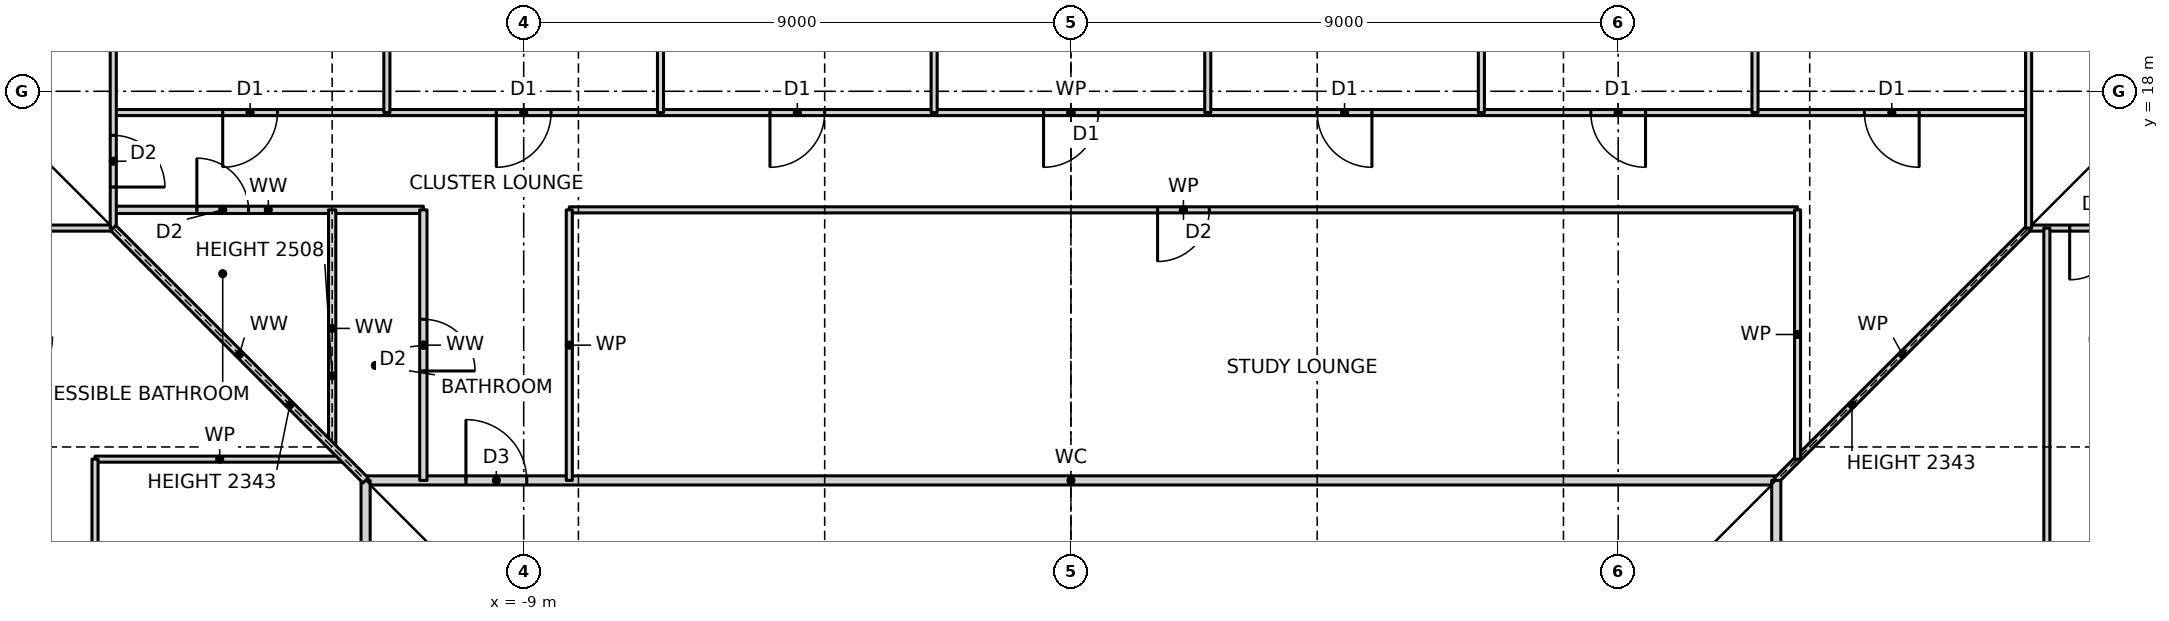
"""IFC4 building model, lengths in metres.
Left out: names, types, materials, properties, quantities, classifications, styles, units other than length and angle.
Written with IfcOpenShell. Run it as: python <this file> out.ifc"""

import sys

from ifc_helpers import new_model, si_unit, direction, frame, frame_2d, origin, place, context, subcontext, project, spatial, rectangle, extrude, element, fill, save


model = new_model("IFC4")
c1 = context("Model", 3, precision=1e-05, world=origin(), true_north=direction((0.0, 1.0)))
c2 = subcontext(c1, "Body", "Model", "MODEL_VIEW")
j1 = project(units=[si_unit("LENGTHUNIT", "METRE"), si_unit("PLANEANGLEUNIT", "RADIAN")], contexts=[c1])
p1 = place(None, origin())
s1 = spatial("IfcSite", under=j1, at=p1, CompositionType="ELEMENT")
p2 = place(p1, origin())
s2 = spatial("IfcBuilding", under=s1, at=p2, CompositionType="ELEMENT")
p3 = place(p2, frame((0.0, 0.0, 22.0)))
s3 = spatial("IfcBuildingStorey", under=s2, at=p3, CompositionType="ELEMENT", Elevation=22.0)
p4 = place(p3, frame((-11.6, 11.6, 0.0), z_axis=(0.0, 0.0, 1.0), x_axis=(1.0, 0.0, 0.0)))
e1 = element("IfcWall", 1, at=p4, inside=s3, PredefinedType="PARTITIONING", context=c2, shape_type="SweptSolid", body=[
    extrude(rectangle(XDim=23.2, YDim=0.15, at=frame_2d((11.6, 0.0))), origin(), (0.0, 0.0, 1.0), 3.27),
])
p5 = place(p4, frame((1.65, 0.0, 0.0)))
e2 = element("IfcOpeningElement", 2, at=p5, cuts=e1, PredefinedType="OPENING", context=c2, shape_type="SweptSolid", body=[
    extrude(rectangle(XDim=1.0, YDim=2.1, at=frame_2d((0.5, 1.05))), frame((0.0, 0.085, 0.0), z_axis=(0.0, -1.0, 0.0), x_axis=(1.0, 0.0, 0.0)), (0.0, 0.0, 1.0), 0.17),
])
p6 = place(p3, frame((-16.05, 11.95, 0.0), z_axis=(0.0, 0.0, 1.0), x_axis=(1.0, 0.0, 0.0)))
e3 = element("IfcWall", 3, at=p6, inside=s3, PredefinedType="PARTITIONING", context=c2, shape_type="SweptSolid", body=[
    extrude(rectangle(XDim=4.1, YDim=0.1, at=frame_2d((2.05, 0.0))), origin(), (0.0, 0.0, 1.0), 3.27),
])
p7 = place(p3, frame((-23.19, 15.75, 0.0), z_axis=(0.0, 0.0, 1.0), x_axis=(1.0, 0.0, 0.0)))
e4 = element("IfcWall", 4, at=p7, inside=s3, PredefinedType="PARTITIONING", context=c2, shape_type="SweptSolid", body=[
    extrude(rectangle(XDim=7.44, YDim=0.1, at=frame_2d((3.72, 0.0))), origin(), (0.0, 0.0, 1.0), 3.27),
])
p8 = place(p3, frame((15.75, 15.75, 0.0), z_axis=(0.0, 0.0, 1.0), x_axis=(1.0, 0.0, 0.0)))
e5 = element("IfcWall", 5, at=p8, inside=s3, PredefinedType="PARTITIONING", context=c2, shape_type="SweptSolid", body=[
    extrude(rectangle(XDim=7.44, YDim=0.1, at=frame_2d((3.72, 0.0))), origin(), (0.0, 0.0, 1.0), 3.27),
])
p9 = place(p8, frame((0.675, 0.0, 0.0)))
e6 = element("IfcOpeningElement", 6, at=p9, cuts=e5, PredefinedType="OPENING", context=c2, shape_type="SweptSolid", body=[
    extrude(rectangle(XDim=0.85, YDim=2.1, at=frame_2d((0.425, 1.05))), frame((0.0, 0.06, 0.0), z_axis=(0.0, -1.0, 0.0), x_axis=(1.0, 0.0, 0.0)), (0.0, 0.0, 1.0), 0.12),
])
p10 = place(p3, frame((-15.75, 16.05, 0.0), z_axis=(0.0, 0.0, 1.0), x_axis=(1.0, 0.0, 0.0)))
e7 = element("IfcWall", 7, at=p10, inside=s3, PredefinedType="PARTITIONING", context=c2, shape_type="SweptSolid", body=[
    extrude(rectangle(XDim=5.1, YDim=0.12, at=frame_2d((2.55, 0.0))), origin(), (0.0, 0.0, 1.0), 3.27),
])
p11 = place(p10, frame((1.375, 0.0, 0.0)))
e8 = element("IfcOpeningElement", 8, at=p11, cuts=e7, PredefinedType="OPENING", context=c2, shape_type="SweptSolid", body=[
    extrude(rectangle(XDim=0.85, YDim=2.1, at=frame_2d((0.425, 1.05))), frame((0.0, 0.07, 0.0), z_axis=(0.0, -1.0, 0.0), x_axis=(1.0, 0.0, 0.0)), (0.0, 0.0, 1.0), 0.14),
])
p12 = place(p3, frame((-8.25, 16.05, 0.0), z_axis=(0.0, 0.0, 1.0), x_axis=(1.0, 0.0, 0.0)))
e9 = element("IfcWall", 9, at=p12, inside=s3, PredefinedType="PARTITIONING", context=c2, shape_type="SweptSolid", body=[
    extrude(rectangle(XDim=20.2, YDim=0.1, at=frame_2d((10.1, 0.0))), origin(), (0.0, 0.0, 1.0), 3.27),
])
p13 = place(p12, frame((9.675, 0.0, 0.0)))
e10 = element("IfcOpeningElement", 10, at=p13, cuts=e9, PredefinedType="OPENING", context=c2, shape_type="SweptSolid", body=[
    extrude(rectangle(XDim=0.85, YDim=2.1, at=frame_2d((0.425, 1.05))), frame((0.0, 0.06, 0.0), z_axis=(0.0, -1.0, 0.0), x_axis=(1.0, 0.0, 0.0)), (0.0, 0.0, 1.0), 0.12),
])
p14 = place(p3, frame((-15.75, 17.65, 0.0), z_axis=(0.0, 0.0, 1.0), x_axis=(1.0, 0.0, 0.0)))
e11 = element("IfcWall", 11, at=p14, inside=s3, PredefinedType="PARTITIONING", context=c2, shape_type="SweptSolid", body=[
    extrude(rectangle(XDim=31.5, YDim=0.1, at=frame_2d((15.75, 0.0))), origin(), (0.0, 0.0, 1.0), 3.27),
])
p15 = place(p14, frame((28.8, 0.0, 0.0)))
e12 = element("IfcOpeningElement", 12, at=p15, cuts=e11, PredefinedType="OPENING", context=c2, shape_type="SweptSolid", body=[
    extrude(rectangle(XDim=0.9, YDim=2.1, at=frame_2d((0.45, 1.05))), frame((0.0, 0.06, 0.0), z_axis=(0.0, -1.0, 0.0), x_axis=(1.0, 0.0, 0.0)), (0.0, 0.0, 1.0), 0.12),
])
p16 = place(p14, frame((24.3, 0.0, 0.0)))
e13 = element("IfcOpeningElement", 13, at=p16, cuts=e11, PredefinedType="OPENING", context=c2, shape_type="SweptSolid", body=[
    extrude(rectangle(XDim=0.9, YDim=2.1, at=frame_2d((0.45, 1.05))), frame((0.0, 0.06, 0.0), z_axis=(0.0, -1.0, 0.0), x_axis=(1.0, 0.0, 0.0)), (0.0, 0.0, 1.0), 0.12),
])
p17 = place(p14, frame((19.8, 0.0, 0.0)))
e14 = element("IfcOpeningElement", 14, at=p17, cuts=e11, PredefinedType="OPENING", context=c2, shape_type="SweptSolid", body=[
    extrude(rectangle(XDim=0.9, YDim=2.1, at=frame_2d((0.45, 1.05))), frame((0.0, 0.06, 0.0), z_axis=(0.0, -1.0, 0.0), x_axis=(1.0, 0.0, 0.0)), (0.0, 0.0, 1.0), 0.12),
])
p18 = place(p14, frame((15.3, 0.0, 0.0)))
e15 = element("IfcOpeningElement", 15, at=p18, cuts=e11, PredefinedType="OPENING", context=c2, shape_type="SweptSolid", body=[
    extrude(rectangle(XDim=0.9, YDim=2.1, at=frame_2d((0.45, 1.05))), frame((0.0, 0.06, 0.0), z_axis=(0.0, -1.0, 0.0), x_axis=(1.0, 0.0, 0.0)), (0.0, 0.0, 1.0), 0.12),
])
p19 = place(p14, frame((10.8, 0.0, 0.0)))
e16 = element("IfcOpeningElement", 16, at=p19, cuts=e11, PredefinedType="OPENING", context=c2, shape_type="SweptSolid", body=[
    extrude(rectangle(XDim=0.9, YDim=2.1, at=frame_2d((0.45, 1.05))), frame((0.0, 0.06, 0.0), z_axis=(0.0, -1.0, 0.0), x_axis=(1.0, 0.0, 0.0)), (0.0, 0.0, 1.0), 0.12),
])
p20 = place(p14, frame((6.3, 0.0, 0.0)))
e17 = element("IfcOpeningElement", 17, at=p20, cuts=e11, PredefinedType="OPENING", context=c2, shape_type="SweptSolid", body=[
    extrude(rectangle(XDim=0.9, YDim=2.1, at=frame_2d((0.45, 1.05))), frame((0.0, 0.06, 0.0), z_axis=(0.0, -1.0, 0.0), x_axis=(1.0, 0.0, 0.0)), (0.0, 0.0, 1.0), 0.12),
])
p21 = place(p14, frame((1.8, 0.0, 0.0)))
e18 = element("IfcOpeningElement", 18, at=p21, cuts=e11, PredefinedType="OPENING", context=c2, shape_type="SweptSolid", body=[
    extrude(rectangle(XDim=0.9, YDim=2.1, at=frame_2d((0.45, 1.05))), frame((0.0, 0.06, 0.0), z_axis=(0.0, -1.0, 0.0), x_axis=(1.0, 0.0, 0.0)), (0.0, 0.0, 1.0), 0.12),
])
p22 = place(p3, frame((11.6, 11.6, 0.0), z_axis=(0.0, 0.0, 1.0), x_axis=(0.707106781187, 0.707106781187, 0.0)))
e19 = element("IfcWall", 19, at=p22, inside=s3, PredefinedType="PARTITIONING", context=c2, shape_type="SweptSolid", body=[
    extrude(rectangle(XDim=5.869, YDim=0.1, at=frame_2d((2.935, 0.0))), origin(), (0.0, 0.0, 1.0), 2.343),
])
p23 = place(p3, frame((16.05, -3.75, 0.0), z_axis=(0.0, 0.0, 1.0), x_axis=(0.0, 1.0, 0.0)))
e20 = element("IfcWall", 20, at=p23, inside=s3, PredefinedType="PARTITIONING", context=c2, shape_type="SweptSolid", body=[
    extrude(rectangle(XDim=19.5, YDim=0.1, at=frame_2d((9.75, 0.0))), origin(), (0.0, 0.0, 1.0), 3.27),
])
p24 = place(p23, frame((9.325, 0.0, 0.0)))
e21 = element("IfcOpeningElement", 21, at=p24, cuts=e20, PredefinedType="OPENING", context=c2, shape_type="SweptSolid", body=[
    extrude(rectangle(XDim=0.85, YDim=2.1, at=frame_2d((0.425, 1.05))), frame((0.0, 0.06, 0.0), z_axis=(0.0, -1.0, 0.0), x_axis=(1.0, 0.0, 0.0)), (0.0, 0.0, 1.0), 0.12),
])
p25 = place(p3, frame((15.75, 15.75, 0.0), z_axis=(0.0, 0.0, 1.0), x_axis=(0.0, 1.0, 0.0)))
e22 = element("IfcWall", 22, at=p25, inside=s3, PredefinedType="PARTITIONING", context=c2, shape_type="SweptSolid", body=[
    extrude(rectangle(XDim=7.44, YDim=0.1, at=frame_2d((3.72, 0.0))), origin(), (0.0, 0.0, 1.0), 3.27),
])
p26 = place(p3, frame((11.95, 11.95, 0.0), z_axis=(0.0, 0.0, 1.0), x_axis=(0.0, 1.0, 0.0)))
e23 = element("IfcWall", 23, at=p26, inside=s3, PredefinedType="PARTITIONING", context=c2, shape_type="SweptSolid", body=[
    extrude(rectangle(XDim=4.1, YDim=0.1, at=frame_2d((2.05, 0.0))), origin(), (0.0, 0.0, 1.0), 3.27),
])
p27 = place(p3, frame((11.6, -12.6, 0.0), z_axis=(0.0, 0.0, 1.0), x_axis=(0.0, 1.0, 0.0)))
e24 = element("IfcWall", 24, at=p27, inside=s3, PredefinedType="PARTITIONING", context=c2, shape_type="SweptSolid", body=[
    extrude(rectangle(XDim=24.2, YDim=0.15, at=frame_2d((12.1, 0.0))), origin(), (0.0, 0.0, 1.0), 3.27),
])
p28 = place(p27, frame((7.0, 0.0, 0.0)))
e25 = element("IfcOpeningElement", 25, at=p28, cuts=e24, PredefinedType="OPENING", context=c2, shape_type="SweptSolid", body=[
    extrude(rectangle(XDim=1.0, YDim=2.1, at=frame_2d((0.5, 1.05))), frame((0.0, 0.085, 0.0), z_axis=(0.0, -1.0, 0.0), x_axis=(1.0, 0.0, 0.0)), (0.0, 0.0, 1.0), 0.17),
])
p29 = place(p27, frame((4.8, 0.0, 0.0)))
e26 = element("IfcOpeningElement", 26, at=p29, cuts=e24, PredefinedType="OPENING", context=c2, shape_type="SweptSolid", body=[
    extrude(rectangle(XDim=0.9, YDim=2.1, at=frame_2d((0.45, 1.05))), frame((0.0, 0.085, 0.0), z_axis=(0.0, -1.0, 0.0), x_axis=(1.0, 0.0, 0.0)), (0.0, 0.0, 1.0), 0.17),
])
for number, where, z_axis, x_axis in (
    (27, (11.25, 17.65, 0.0), (0.0, 0.0, 1.0), (0.0, 1.0, 0.0)),
    (28, (6.75, 17.65, 0.0), (0.0, 0.0, 1.0), (0.0, 1.0, 0.0)),
    (29, (2.25, 17.65, 0.0), (0.0, 0.0, 1.0), (0.0, 1.0, 0.0)),
    (30, (-2.25, 17.65, 0.0), (0.0, 0.0, 1.0), (0.0, 1.0, 0.0)),
    (31, (-6.75, 17.65, 0.0), (0.0, 0.0, 1.0), (0.0, 1.0, 0.0)),
):
    element("IfcWall", number, at=place(p3, frame(where, z_axis=z_axis, x_axis=x_axis)), inside=s3, PredefinedType="PARTITIONING", context=c2, shape_type="SweptSolid", body=[
        extrude(rectangle(XDim=5.54, YDim=0.1, at=frame_2d((2.77, 0.0))), origin(), (0.0, 0.0, 1.0), 3.27),
    ])
p30 = place(p3, frame((-8.25, 11.6, 0.0), z_axis=(0.0, 0.0, 1.0), x_axis=(0.0, 1.0, 0.0)))
e32 = element("IfcWall", 32, at=p30, inside=s3, PredefinedType="PARTITIONING", context=c2, shape_type="SweptSolid", body=[
    extrude(rectangle(XDim=4.45, YDim=0.1, at=frame_2d((2.225, 0.0))), origin(), (0.0, 0.0, 1.0), 3.27),
])
p31 = place(p3, frame((-10.65, 11.6, 0.0), z_axis=(0.0, 0.0, 1.0), x_axis=(0.0, 1.0, 0.0)))
e33 = element("IfcWall", 33, at=p31, inside=s3, PredefinedType="PARTITIONING", context=c2, shape_type="SweptSolid", body=[
    extrude(rectangle(XDim=4.45, YDim=0.12, at=frame_2d((2.225, 0.0))), origin(), (0.0, 0.0, 1.0), 3.27),
])
p32 = place(p31, frame((1.8, 0.0, 0.0)))
e34 = element("IfcOpeningElement", 34, at=p32, cuts=e33, PredefinedType="OPENING", context=c2, shape_type="SweptSolid", body=[
    extrude(rectangle(XDim=0.85, YDim=2.1, at=frame_2d((0.425, 1.05))), frame((0.0, 0.07, 0.0), z_axis=(0.0, -1.0, 0.0), x_axis=(1.0, 0.0, 0.0)), (0.0, 0.0, 1.0), 0.14),
])
p33 = place(p3, frame((-11.25, 17.65, 0.0), z_axis=(0.0, 0.0, 1.0), x_axis=(0.0, 1.0, 0.0)))
e35 = element("IfcWall", 35, at=p33, inside=s3, PredefinedType="PARTITIONING", context=c2, shape_type="SweptSolid", body=[
    extrude(rectangle(XDim=5.54, YDim=0.1, at=frame_2d((2.77, 0.0))), origin(), (0.0, 0.0, 1.0), 3.27),
])
p34 = place(p3, frame((-11.6, -12.6, 0.0), z_axis=(0.0, 0.0, 1.0), x_axis=(0.0, 1.0, 0.0)))
e36 = element("IfcWall", 36, at=p34, inside=s3, PredefinedType="PARTITIONING", context=c2, shape_type="SweptSolid", body=[
    extrude(rectangle(XDim=24.2, YDim=0.15, at=frame_2d((12.1, 0.0))), origin(), (0.0, 0.0, 1.0), 3.27),
])
p35 = place(p34, frame((2.65, 0.0, 0.0)))
e37 = element("IfcOpeningElement", 37, at=p35, cuts=e36, PredefinedType="OPENING", context=c2, shape_type="SweptSolid", body=[
    extrude(rectangle(XDim=1.0, YDim=2.1, at=frame_2d((0.5, 1.05))), frame((0.0, 0.085, 0.0), z_axis=(0.0, -1.0, 0.0), x_axis=(1.0, 0.0, 0.0)), (0.0, 0.0, 1.0), 0.17),
])
p36 = place(p3, frame((-12.15, 12.15, 0.0), z_axis=(0.0, 0.0, 1.0), x_axis=(0.0, 1.0, 0.0)))
e38 = element("IfcWall", 38, at=p36, inside=s3, PredefinedType="PARTITIONING", context=c2, shape_type="SweptSolid", body=[
    extrude(rectangle(XDim=3.9, YDim=0.12, at=frame_2d((1.95, 0.0))), origin(), (0.0, 0.0, 1.0), 2.508),
])
p37 = place(p3, frame((-15.75, 15.75, 0.0), z_axis=(0.0, 0.0, 1.0), x_axis=(0.0, 1.0, 0.0)))
e39 = element("IfcWall", 39, at=p37, inside=s3, PredefinedType="PARTITIONING", context=c2, shape_type="SweptSolid", body=[
    extrude(rectangle(XDim=7.44, YDim=0.1, at=frame_2d((3.72, 0.0))), origin(), (0.0, 0.0, 1.0), 3.27),
])
p38 = place(p37, frame((0.675, 0.0, 0.0)))
e40 = element("IfcOpeningElement", 40, at=p38, cuts=e39, PredefinedType="OPENING", context=c2, shape_type="SweptSolid", body=[
    extrude(rectangle(XDim=0.85, YDim=2.1, at=frame_2d((0.425, 1.05))), frame((0.0, 0.06, 0.0), z_axis=(0.0, -1.0, 0.0), x_axis=(1.0, 0.0, 0.0)), (0.0, 0.0, 1.0), 0.12),
])
p39 = place(p3, frame((-16.05, -8.25, 0.0), z_axis=(0.0, 0.0, 1.0), x_axis=(0.0, 1.0, 0.0)))
e41 = element("IfcWall", 41, at=p39, inside=s3, PredefinedType="PARTITIONING", context=c2, shape_type="SweptSolid", body=[
    extrude(rectangle(XDim=20.2, YDim=0.1, at=frame_2d((10.1, 0.0))), origin(), (0.0, 0.0, 1.0), 3.27),
])
p40 = place(p39, frame((9.675, 0.0, 0.0)))
e42 = element("IfcOpeningElement", 42, at=p40, cuts=e41, PredefinedType="OPENING", context=c2, shape_type="SweptSolid", body=[
    extrude(rectangle(XDim=0.85, YDim=2.1, at=frame_2d((0.425, 1.05))), frame((0.0, 0.06, 0.0), z_axis=(0.0, -1.0, 0.0), x_axis=(1.0, 0.0, 0.0)), (0.0, 0.0, 1.0), 0.12),
])
p41 = place(p3, frame((-11.6, 11.6, 0.0), z_axis=(0.0, 0.0, 1.0), x_axis=(-0.707106781187, 0.707106781187, 0.0)))
e43 = element("IfcWall", 43, at=p41, inside=s3, PredefinedType="PARTITIONING", context=c2, shape_type="SweptSolid", body=[
    extrude(rectangle(XDim=5.869, YDim=0.12, at=frame_2d((2.935, 0.0))), origin(), (0.0, 0.0, 1.0), 2.343),
])
p42 = place(p15, frame((0.9, 0.0, 0.0), z_axis=(0.0, 0.0, 1.0), x_axis=(-1.0, 0.0, 0.0)))
e44 = element("IfcDoor", 44, at=p42, inside=s3, OperationType="SINGLE_SWING_LEFT", PredefinedType="DOOR", context=c2, shape_type="SweptSolid", body=[
    extrude(rectangle(XDim=0.9, YDim=2.1, at=frame_2d((0.45, 1.05))), frame((0.0, 0.025, 0.0), z_axis=(0.0, -1.0, 0.0), x_axis=(1.0, 0.0, 0.0)), (0.0, 0.0, 1.0), 0.05),
])
fill(e12, e44)
p43 = place(p16, frame((0.9, 0.0, 0.0), z_axis=(0.0, 0.0, 1.0), x_axis=(-1.0, 0.0, 0.0)))
e45 = element("IfcDoor", 45, at=p43, inside=s3, OperationType="SINGLE_SWING_LEFT", PredefinedType="DOOR", context=c2, shape_type="SweptSolid", body=[
    extrude(rectangle(XDim=0.9, YDim=2.1, at=frame_2d((0.45, 1.05))), frame((0.0, 0.025, 0.0), z_axis=(0.0, -1.0, 0.0), x_axis=(1.0, 0.0, 0.0)), (0.0, 0.0, 1.0), 0.05),
])
fill(e13, e45)
p44 = place(p17, frame((0.9, 0.0, 0.0), z_axis=(0.0, 0.0, 1.0), x_axis=(-1.0, 0.0, 0.0)))
e46 = element("IfcDoor", 46, at=p44, inside=s3, OperationType="SINGLE_SWING_LEFT", PredefinedType="DOOR", context=c2, shape_type="SweptSolid", body=[
    extrude(rectangle(XDim=0.9, YDim=2.1, at=frame_2d((0.45, 1.05))), frame((0.0, 0.025, 0.0), z_axis=(0.0, -1.0, 0.0), x_axis=(1.0, 0.0, 0.0)), (0.0, 0.0, 1.0), 0.05),
])
fill(e14, e46)
p45 = place(p18, frame((0.9, 0.0, 0.0), z_axis=(0.0, 0.0, 1.0), x_axis=(-1.0, 0.0, 0.0)))
e47 = element("IfcDoor", 47, at=p45, inside=s3, OperationType="SINGLE_SWING_RIGHT", PredefinedType="DOOR", context=c2, shape_type="SweptSolid", body=[
    extrude(rectangle(XDim=0.9, YDim=2.1, at=frame_2d((0.45, 1.05))), frame((0.0, 0.025, 0.0), z_axis=(0.0, -1.0, 0.0), x_axis=(1.0, 0.0, 0.0)), (0.0, 0.0, 1.0), 0.05),
])
fill(e15, e47)
p46 = place(p19, frame((0.9, 0.0, 0.0), z_axis=(0.0, 0.0, 1.0), x_axis=(-1.0, 0.0, 0.0)))
e48 = element("IfcDoor", 48, at=p46, inside=s3, OperationType="SINGLE_SWING_RIGHT", PredefinedType="DOOR", context=c2, shape_type="SweptSolid", body=[
    extrude(rectangle(XDim=0.9, YDim=2.1, at=frame_2d((0.45, 1.05))), frame((0.0, 0.025, 0.0), z_axis=(0.0, -1.0, 0.0), x_axis=(1.0, 0.0, 0.0)), (0.0, 0.0, 1.0), 0.05),
])
fill(e16, e48)
p47 = place(p20, frame((0.9, 0.0, 0.0), z_axis=(0.0, 0.0, 1.0), x_axis=(-1.0, 0.0, 0.0)))
e49 = element("IfcDoor", 49, at=p47, inside=s3, OperationType="SINGLE_SWING_RIGHT", PredefinedType="DOOR", context=c2, shape_type="SweptSolid", body=[
    extrude(rectangle(XDim=0.9, YDim=2.1, at=frame_2d((0.45, 1.05))), frame((0.0, 0.025, 0.0), z_axis=(0.0, -1.0, 0.0), x_axis=(1.0, 0.0, 0.0)), (0.0, 0.0, 1.0), 0.05),
])
fill(e17, e49)
p48 = place(p21, frame((0.9, 0.0, 0.0), z_axis=(0.0, 0.0, 1.0), x_axis=(-1.0, 0.0, 0.0)))
e50 = element("IfcDoor", 50, at=p48, inside=s3, OperationType="SINGLE_SWING_RIGHT", PredefinedType="DOOR", context=c2, shape_type="SweptSolid", body=[
    extrude(rectangle(XDim=0.9, YDim=2.1, at=frame_2d((0.45, 1.05))), frame((0.0, 0.025, 0.0), z_axis=(0.0, -1.0, 0.0), x_axis=(1.0, 0.0, 0.0)), (0.0, 0.0, 1.0), 0.05),
])
fill(e18, e50)
p49 = place(p5, origin())
e51 = element("IfcDoor", 51, at=p49, inside=s3, OperationType="SINGLE_SWING_LEFT", PredefinedType="DOOR", context=c2, shape_type="SweptSolid", body=[
    extrude(rectangle(XDim=1.0, YDim=2.1, at=frame_2d((0.5, 1.05))), frame((0.0, 0.025, 0.0), z_axis=(0.0, -1.0, 0.0), x_axis=(1.0, 0.0, 0.0)), (0.0, 0.0, 1.0), 0.05),
])
fill(e2, e51)
p50 = place(p13, frame((0.85, 0.0, 0.0), z_axis=(0.0, 0.0, 1.0), x_axis=(-1.0, 0.0, 0.0)))
e52 = element("IfcDoor", 52, at=p50, inside=s3, OperationType="SINGLE_SWING_RIGHT", PredefinedType="DOOR", context=c2, shape_type="SweptSolid", body=[
    extrude(rectangle(XDim=0.85, YDim=2.1, at=frame_2d((0.425, 1.05))), frame((0.0, 0.025, 0.0), z_axis=(0.0, -1.0, 0.0), x_axis=(1.0, 0.0, 0.0)), (0.0, 0.0, 1.0), 0.05),
])
fill(e10, e52)
p51 = place(p32, frame((0.85, 0.0, 0.0), z_axis=(0.0, 0.0, 1.0), x_axis=(-1.0, 0.0, 0.0)))
e53 = element("IfcDoor", 53, at=p51, inside=s3, OperationType="SINGLE_SWING_RIGHT", PredefinedType="DOOR", context=c2, shape_type="SweptSolid", body=[
    extrude(rectangle(XDim=0.85, YDim=2.1, at=frame_2d((0.425, 1.05))), frame((0.0, 0.025, 0.0), z_axis=(0.0, -1.0, 0.0), x_axis=(1.0, 0.0, 0.0)), (0.0, 0.0, 1.0), 0.05),
])
fill(e34, e53)
p52 = place(p11, origin())
e54 = element("IfcDoor", 54, at=p52, inside=s3, OperationType="SINGLE_SWING_LEFT", PredefinedType="DOOR", context=c2, shape_type="SweptSolid", body=[
    extrude(rectangle(XDim=0.85, YDim=2.1, at=frame_2d((0.425, 1.05))), frame((0.0, 0.025, 0.0), z_axis=(0.0, -1.0, 0.0), x_axis=(1.0, 0.0, 0.0)), (0.0, 0.0, 1.0), 0.05),
])
fill(e8, e54)
p53 = place(p9, frame((0.85, 0.0, 0.0), z_axis=(0.0, 0.0, 1.0), x_axis=(-1.0, 0.0, 0.0)))
e55 = element("IfcDoor", 55, at=p53, inside=s3, OperationType="SINGLE_SWING_RIGHT", PredefinedType="DOOR", context=c2, shape_type="SweptSolid", body=[
    extrude(rectangle(XDim=0.85, YDim=2.1, at=frame_2d((0.425, 1.05))), frame((0.0, 0.025, 0.0), z_axis=(0.0, -1.0, 0.0), x_axis=(1.0, 0.0, 0.0)), (0.0, 0.0, 1.0), 0.05),
])
fill(e6, e55)
p54 = place(p38, frame((0.85, 0.0, 0.0), z_axis=(0.0, 0.0, 1.0), x_axis=(-1.0, 0.0, 0.0)))
e56 = element("IfcDoor", 56, at=p54, inside=s3, OperationType="SINGLE_SWING_RIGHT", PredefinedType="DOOR", context=c2, shape_type="SweptSolid", body=[
    extrude(rectangle(XDim=0.85, YDim=2.1, at=frame_2d((0.425, 1.05))), frame((0.0, 0.025, 0.0), z_axis=(0.0, -1.0, 0.0), x_axis=(1.0, 0.0, 0.0)), (0.0, 0.0, 1.0), 0.05),
])
fill(e40, e56)
save(model, sys.argv[1])
